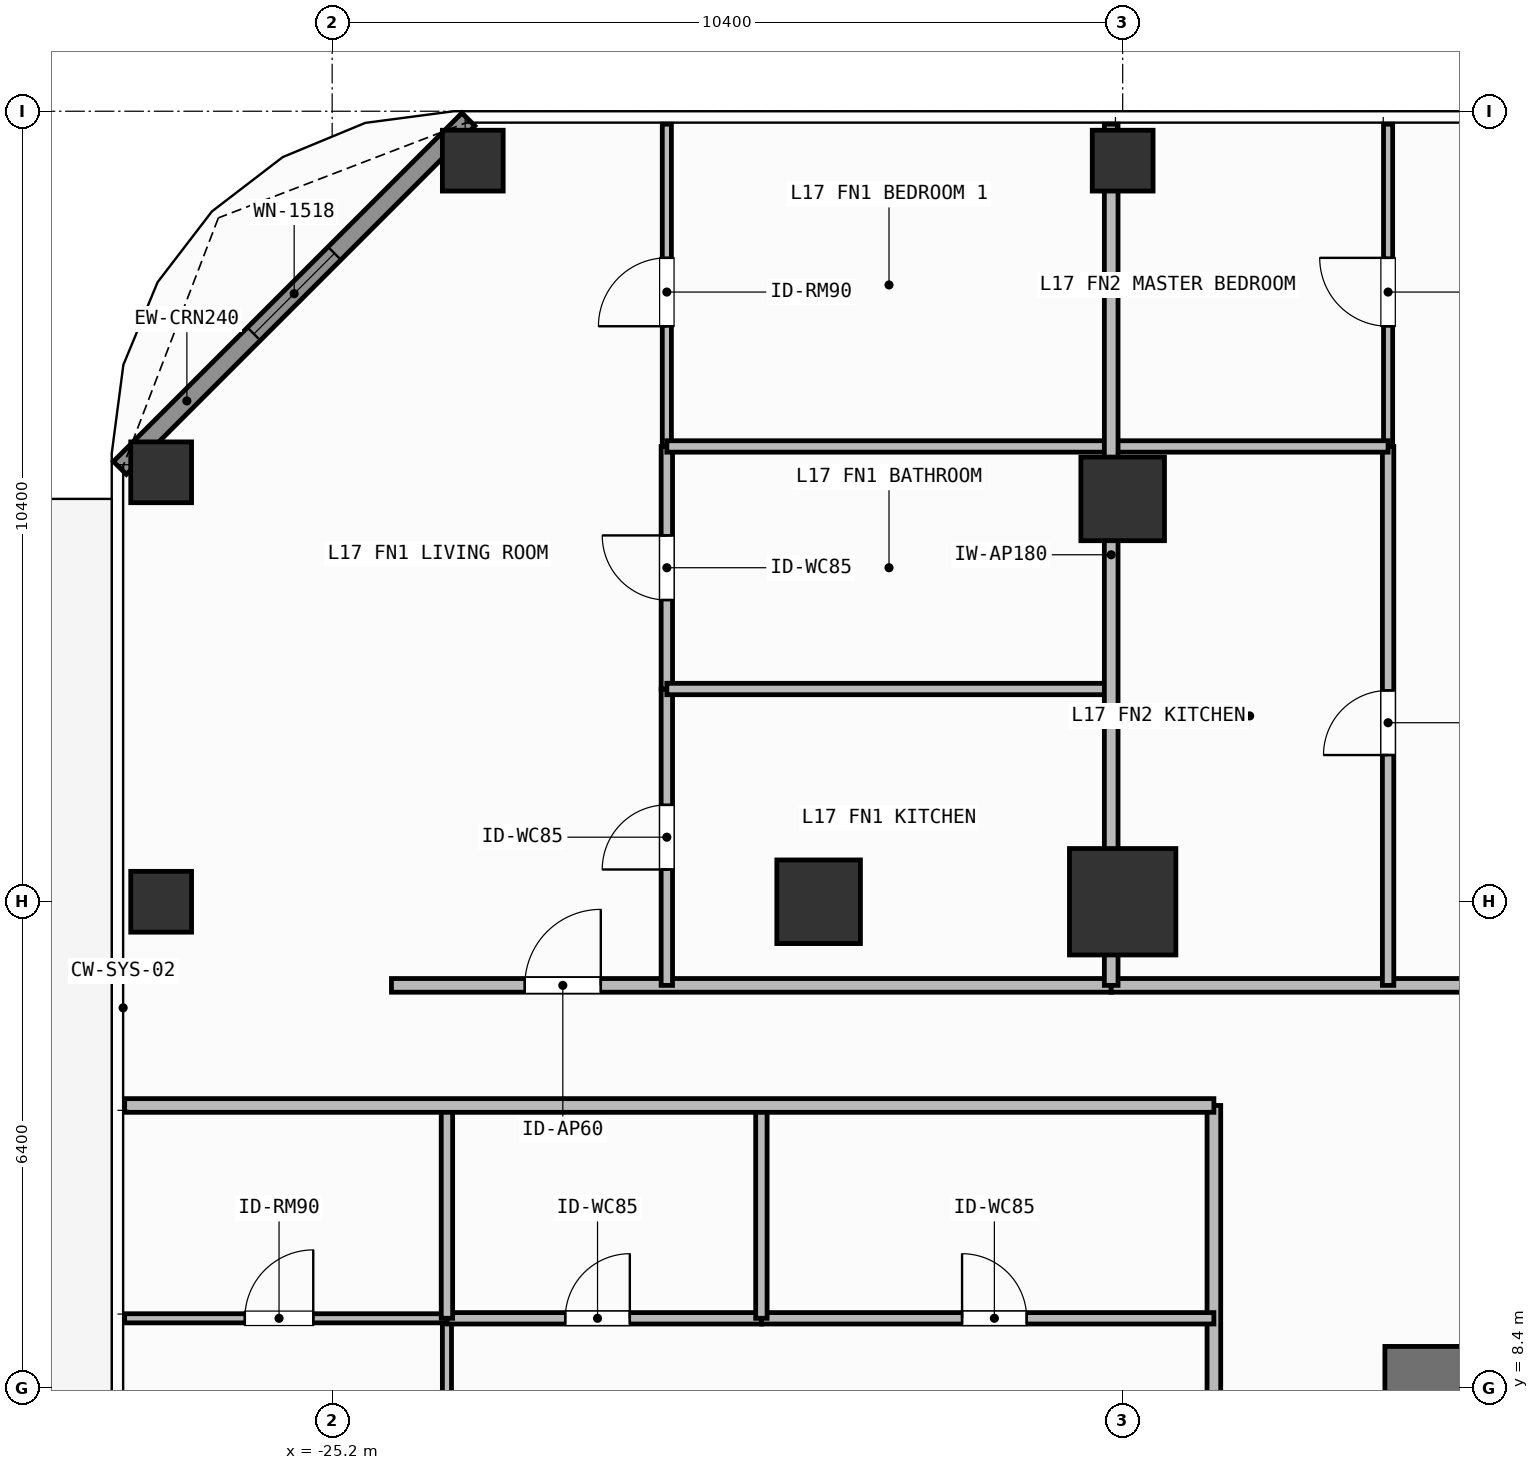
"""IFC4 building model, lengths in metres.
Left out: names, types, materials, properties, quantities, classifications, styles, units other than length and angle.
Written with IfcOpenShell. Run it as: python <this file> out.ifc"""

import sys

from ifc_helpers import new_model, si_unit, direction, frame, frame_2d, origin, origin_2d, place, context, subcontext, project, spatial, rectangle, hollow_rectangle, extrude, element, fill, save


model = new_model("IFC4")
c1 = context("Model", 3, precision=1e-05, world=origin(), true_north=direction((0.0, 1.0)))
c2 = subcontext(c1, "Body", "Model", "MODEL_VIEW")
j1 = project(units=[si_unit("LENGTHUNIT", "METRE"), si_unit("PLANEANGLEUNIT", "RADIAN")], contexts=[c1])
p1 = place(None, origin())
s1 = spatial("IfcSite", under=j1, at=p1, CompositionType="ELEMENT")
p2 = place(p1, origin())
s2 = spatial("IfcBuilding", under=s1, at=p2, CompositionType="ELEMENT")
p3 = place(p2, frame((0.0, 0.0, 65.7)))
s3 = spatial("IfcBuildingStorey", under=s2, at=p3, CompositionType="ELEMENT", Elevation=65.7)
p4 = place(p3, frame((-11.35, 8.4, 0.0), z_axis=(0.0, 0.0, 1.0), x_axis=(1.0, 0.0, 0.0)))
e1 = element("IfcWall", 1, at=p4, inside=s3, PredefinedType="SHEAR", context=c2, shape_type="SweptSolid", body=[
    extrude(rectangle(XDim=1.65, YDim=1.1, at=frame_2d((0.825, 0.0))), origin(), (0.0, 0.0, 1.0), 3.9),
])
p5 = place(p3, frame((-14.8, 14.8, 0.0), z_axis=(0.0, 0.0, 1.0), x_axis=(1.0, 0.0, 0.0)))
e2 = element("IfcColumn", 2, at=p5, inside=s3, PredefinedType="COLUMN", context=c2, shape_type="SweptSolid", body=[
    extrude(rectangle(XDim=1.4, YDim=1.4, at=origin_2d()), origin(), (0.0, 0.0, 1.0), 3.9),
])
for number, where, z_axis, x_axis in (
    (3, (-18.8, 14.8, 0.0), (0.0, 0.0, 1.0), (1.0, 0.0, 0.0)),
    (4, (-14.8, 20.1, 0.0), (0.0, 0.0, 1.0), (1.0, 0.0, 0.0)),
):
    element("IfcColumn", number, at=place(p3, frame(where, z_axis=z_axis, x_axis=x_axis)), inside=s3, PredefinedType="COLUMN", context=c2, shape_type="SweptSolid", body=[
        extrude(rectangle(XDim=1.1, YDim=1.1, at=origin_2d()), origin(), (0.0, 0.0, 1.0), 3.9),
    ])
for number, where, z_axis, x_axis in (
    (5, (-23.35, 24.55, 0.0), (0.0, 0.0, 1.0), (1.0, 0.0, 0.0)),
    (6, (-27.45, 20.45, 0.0), (0.0, 0.0, 1.0), (1.0, 0.0, 0.0)),
    (7, (-14.8, 24.55, 0.0), (0.0, 0.0, 1.0), (1.0, 0.0, 0.0)),
    (8, (-27.45, 14.8, 0.0), (0.0, 0.0, 1.0), (1.0, 0.0, 0.0)),
):
    element("IfcColumn", number, at=place(p3, frame(where, z_axis=z_axis, x_axis=x_axis)), inside=s3, PredefinedType="COLUMN", context=c2, shape_type="SweptSolid", body=[
        extrude(hollow_rectangle(XDim=0.8, YDim=0.8, WallThickness=0.036, at=origin_2d()), origin(), (0.0, 0.0, 1.0), 3.9),
    ])
p6 = place(p3, frame((-27.992, 20.508, 0.0), z_axis=(0.0, 0.0, 1.0), x_axis=(0.707106781187, 0.707106781187, 0.0)))
e9 = element("IfcWall", 9, at=p6, inside=s3, PredefinedType="SOLIDWALL", context=c2, shape_type="SweptSolid", body=[
    extrude(rectangle(XDim=6.484, YDim=0.24, at=frame_2d((3.242, 0.0))), origin(), (0.0, 0.0, 1.0), 3.68),
])
p7 = place(p6, frame((2.492, 0.0, 0.8)))
e10 = element("IfcOpeningElement", 10, at=p7, cuts=e9, PredefinedType="OPENING", context=c2, shape_type="SweptSolid", body=[
    extrude(rectangle(XDim=1.5, YDim=1.85, at=frame_2d((0.75, 0.925))), frame((0.0, 0.13, 0.0), z_axis=(0.0, -1.0, 0.0), x_axis=(1.0, 0.0, 0.0)), (0.0, 0.0, 1.0), 0.26),
])
p8 = place(p3, frame((-24.42, 13.7, 0.0), z_axis=(0.0, 0.0, 1.0), x_axis=(1.0, 0.0, 0.0)))
e11 = element("IfcWall", 11, at=p8, inside=s3, PredefinedType="PARTITIONING", context=c2, shape_type="SweptSolid", body=[
    extrude(rectangle(XDim=9.469, YDim=0.18, at=frame_2d((4.734, 0.0))), origin(), (0.0, 0.0, 1.0), 3.68),
])
p9 = place(p8, frame((1.754, 0.0, 0.0)))
e12 = element("IfcOpeningElement", 12, at=p9, cuts=e11, PredefinedType="OPENING", context=c2, shape_type="SweptSolid", body=[
    extrude(rectangle(XDim=1.0, YDim=2.2, at=frame_2d((0.5, 1.1))), frame((0.0, 0.1, 0.0), z_axis=(0.0, -1.0, 0.0), x_axis=(1.0, 0.0, 0.0)), (0.0, 0.0, 1.0), 0.2),
])
p10 = place(p3, frame((-20.797, 13.7, 0.0), z_axis=(0.0, 0.0, 1.0), x_axis=(0.0, 1.0, 0.0)))
e13 = element("IfcWall", 13, at=p10, inside=s3, PredefinedType="PARTITIONING", context=c2, shape_type="SweptSolid", body=[
    extrude(rectangle(XDim=3.899, YDim=0.15, at=frame_2d((1.95, 0.0))), origin(), (0.0, 0.0, 1.0), 3.68),
])
p11 = place(p10, frame((1.524, 0.0, 0.0)))
e14 = element("IfcOpeningElement", 14, at=p11, cuts=e13, PredefinedType="OPENING", context=c2, shape_type="SweptSolid", body=[
    extrude(rectangle(XDim=0.85, YDim=2.1, at=frame_2d((0.425, 1.05))), frame((0.0, 0.085, 0.0), z_axis=(0.0, -1.0, 0.0), x_axis=(1.0, 0.0, 0.0)), (0.0, 0.0, 1.0), 0.17),
])
p12 = place(p3, frame((-20.797, 17.599, 0.0), z_axis=(0.0, 0.0, 1.0), x_axis=(0.0, 1.0, 0.0)))
e15 = element("IfcWall", 15, at=p12, inside=s3, PredefinedType="PARTITIONING", context=c2, shape_type="SweptSolid", body=[
    extrude(rectangle(XDim=3.191, YDim=0.15, at=frame_2d((1.595, 0.0))), origin(), (0.0, 0.0, 1.0), 3.68),
])
p13 = place(p12, frame((1.17, 0.0, 0.0)))
e16 = element("IfcOpeningElement", 16, at=p13, cuts=e15, PredefinedType="OPENING", context=c2, shape_type="SweptSolid", body=[
    extrude(rectangle(XDim=0.85, YDim=2.1, at=frame_2d((0.425, 1.05))), frame((0.0, 0.085, 0.0), z_axis=(0.0, -1.0, 0.0), x_axis=(1.0, 0.0, 0.0)), (0.0, 0.0, 1.0), 0.17),
])
p14 = place(p3, frame((-20.797, 20.79, 0.0), z_axis=(0.0, 0.0, 1.0), x_axis=(0.0, 1.0, 0.0)))
e17 = element("IfcWall", 17, at=p14, inside=s3, PredefinedType="PARTITIONING", context=c2, shape_type="SweptSolid", body=[
    extrude(rectangle(XDim=4.24, YDim=0.12, at=frame_2d((2.12, 0.0))), origin(), (0.0, 0.0, 1.0), 3.68),
])
p15 = place(p14, frame((1.581, 0.0, 0.0)))
e18 = element("IfcOpeningElement", 18, at=p15, cuts=e17, PredefinedType="OPENING", context=c2, shape_type="SweptSolid", body=[
    extrude(rectangle(XDim=0.9, YDim=2.1, at=frame_2d((0.45, 1.05))), frame((0.0, 0.07, 0.0), z_axis=(0.0, -1.0, 0.0), x_axis=(1.0, 0.0, 0.0)), (0.0, 0.0, 1.0), 0.14),
])
p16 = place(p3, frame((-14.951, 13.7, 0.0), z_axis=(0.0, 0.0, 1.0), x_axis=(1.0, 0.0, 0.0)))
e19 = element("IfcWall", 19, at=p16, inside=s3, PredefinedType="PARTITIONING", context=c2, shape_type="SweptSolid", body=[
    extrude(rectangle(XDim=12.051, YDim=0.18, at=frame_2d((6.025, 0.0))), origin(), (0.0, 0.0, 1.0), 3.68),
])
p17 = place(p16, frame((5.704, 0.0, 0.0)))
e20 = element("IfcOpeningElement", 20, at=p17, cuts=e19, PredefinedType="OPENING", context=c2, shape_type="SweptSolid", body=[
    extrude(rectangle(XDim=1.0, YDim=2.2, at=frame_2d((0.5, 1.1))), frame((0.0, 0.1, 0.0), z_axis=(0.0, -1.0, 0.0), x_axis=(1.0, 0.0, 0.0)), (0.0, 0.0, 1.0), 0.2),
])
p18 = place(p3, frame((-11.308, 13.7, 0.0), z_axis=(0.0, 0.0, 1.0), x_axis=(0.0, 1.0, 0.0)))
e21 = element("IfcWall", 21, at=p18, inside=s3, PredefinedType="PARTITIONING", context=c2, shape_type="SweptSolid", body=[
    extrude(rectangle(XDim=7.09, YDim=0.15, at=frame_2d((3.545, 0.0))), origin(), (0.0, 0.0, 1.0), 3.37),
])
p19 = place(p18, frame((3.03, 0.0, 0.0)))
e22 = element("IfcOpeningElement", 22, at=p19, cuts=e21, PredefinedType="OPENING", context=c2, shape_type="SweptSolid", body=[
    extrude(rectangle(XDim=0.85, YDim=2.1, at=frame_2d((0.425, 1.05))), frame((0.0, 0.085, 0.0), z_axis=(0.0, -1.0, 0.0), x_axis=(1.0, 0.0, 0.0)), (0.0, 0.0, 1.0), 0.17),
])
p20 = place(p3, frame((-11.308, 20.79, 0.0), z_axis=(0.0, 0.0, 1.0), x_axis=(0.0, 1.0, 0.0)))
e23 = element("IfcWall", 23, at=p20, inside=s3, PredefinedType="PARTITIONING", context=c2, shape_type="SweptSolid", body=[
    extrude(rectangle(XDim=4.24, YDim=0.12, at=frame_2d((2.12, 0.0))), origin(), (0.0, 0.0, 1.0), 3.37),
])
p21 = place(p20, frame((1.581, 0.0, 0.0)))
e24 = element("IfcOpeningElement", 24, at=p21, cuts=e23, PredefinedType="OPENING", context=c2, shape_type="SweptSolid", body=[
    extrude(rectangle(XDim=0.9, YDim=2.1, at=frame_2d((0.45, 1.05))), frame((0.0, 0.07, 0.0), z_axis=(0.0, -1.0, 0.0), x_axis=(1.0, 0.0, 0.0)), (0.0, 0.0, 1.0), 0.14),
])
p22 = place(p3, frame((-13.6, -0.873, 0.0), z_axis=(0.0, 0.0, 1.0), x_axis=(0.0, 1.0, 0.0)))
e25 = element("IfcWall", 25, at=p22, inside=s3, PredefinedType="PARTITIONING", context=c2, shape_type="SweptSolid", body=[
    extrude(rectangle(XDim=12.993, YDim=0.18, at=frame_2d((6.497, 0.0))), origin(), (0.0, 0.0, 1.0), 3.68),
])
p23 = place(p22, frame((6.446, 0.0, 0.0)))
e26 = element("IfcOpeningElement", 26, at=p23, cuts=e25, PredefinedType="OPENING", context=c2, shape_type="SweptSolid", body=[
    extrude(rectangle(XDim=1.0, YDim=2.2, at=frame_2d((0.5, 1.1))), frame((0.0, 0.1, 0.0), z_axis=(0.0, -1.0, 0.0), x_axis=(1.0, 0.0, 0.0)), (0.0, 0.0, 1.0), 0.2),
])
p24 = place(p3, frame((-23.69, 3.097, 0.0), z_axis=(0.0, 0.0, 1.0), x_axis=(0.0, 1.0, 0.0)))
e27 = element("IfcWall", 27, at=p24, inside=s3, PredefinedType="PARTITIONING", context=c2, shape_type="SweptSolid", body=[
    extrude(rectangle(XDim=6.223, YDim=0.12, at=frame_2d((3.112, 0.0))), origin(), (0.0, 0.0, 1.0), 3.68),
])
p25 = place(p24, frame((2.662, 0.0, 0.0)))
e28 = element("IfcOpeningElement", 28, at=p25, cuts=e27, PredefinedType="OPENING", context=c2, shape_type="SweptSolid", body=[
    extrude(rectangle(XDim=0.9, YDim=2.1, at=frame_2d((0.45, 1.05))), frame((0.0, 0.07, 0.0), z_axis=(0.0, -1.0, 0.0), x_axis=(1.0, 0.0, 0.0)), (0.0, 0.0, 1.0), 0.14),
])
p26 = place(p3, frame((-23.69, 9.32, 0.0), z_axis=(0.0, 0.0, 1.0), x_axis=(1.0, 0.0, 0.0)))
e29 = element("IfcWall", 29, at=p26, inside=s3, PredefinedType="PARTITIONING", context=c2, shape_type="SweptSolid", body=[
    extrude(rectangle(XDim=4.137, YDim=0.15, at=frame_2d((2.068, 0.0))), origin(), (0.0, 0.0, 1.0), 3.68),
])
p27 = place(p26, frame((1.556, 0.0, 0.0)))
e30 = element("IfcOpeningElement", 30, at=p27, cuts=e29, PredefinedType="OPENING", context=c2, shape_type="SweptSolid", body=[
    extrude(rectangle(XDim=0.85, YDim=2.1, at=frame_2d((0.425, 1.05))), frame((0.0, 0.085, 0.0), z_axis=(0.0, -1.0, 0.0), x_axis=(1.0, 0.0, 0.0)), (0.0, 0.0, 1.0), 0.17),
])
p28 = place(p3, frame((-19.553, 9.32, 0.0), z_axis=(0.0, 0.0, 1.0), x_axis=(1.0, 0.0, 0.0)))
e31 = element("IfcWall", 31, at=p28, inside=s3, PredefinedType="PARTITIONING", context=c2, shape_type="SweptSolid", body=[
    extrude(rectangle(XDim=5.953, YDim=0.15, at=frame_2d((2.977, 0.0))), origin(), (0.0, 0.0, 1.0), 3.68),
])
p29 = place(p28, frame((2.64, 0.0, 0.0)))
e32 = element("IfcOpeningElement", 32, at=p29, cuts=e31, PredefinedType="OPENING", context=c2, shape_type="SweptSolid", body=[
    extrude(rectangle(XDim=0.85, YDim=2.1, at=frame_2d((0.425, 1.05))), frame((0.0, 0.085, 0.0), z_axis=(0.0, -1.0, 0.0), x_axis=(1.0, 0.0, 0.0)), (0.0, 0.0, 1.0), 0.17),
])
p30 = place(p3, frame((-27.93, 9.32, 0.0), z_axis=(0.0, 0.0, 1.0), x_axis=(1.0, 0.0, 0.0)))
e33 = element("IfcWall", 33, at=p30, inside=s3, PredefinedType="PARTITIONING", context=c2, shape_type="SweptSolid", body=[
    extrude(rectangle(XDim=4.24, YDim=0.12, at=frame_2d((2.12, 0.0))), origin(), (0.0, 0.0, 1.0), 3.68),
])
p31 = place(p30, frame((1.581, 0.0, 0.0)))
e34 = element("IfcOpeningElement", 34, at=p31, cuts=e33, PredefinedType="OPENING", context=c2, shape_type="SweptSolid", body=[
    extrude(rectangle(XDim=0.9, YDim=2.1, at=frame_2d((0.45, 1.05))), frame((0.0, 0.07, 0.0), z_axis=(0.0, -1.0, 0.0), x_axis=(1.0, 0.0, 0.0)), (0.0, 0.0, 1.0), 0.14),
])
for number, where, z_axis, x_axis in (
    (35, (-20.797, 17.599, 0.0), (0.0, 0.0, 1.0), (1.0, 0.0, 0.0)),
    (36, (-20.797, 20.79, 0.0), (0.0, 0.0, 1.0), (1.0, 0.0, 0.0)),
):
    element("IfcWall", number, at=place(p3, frame(where, z_axis=z_axis, x_axis=x_axis)), inside=s3, PredefinedType="PARTITIONING", context=c2, shape_type="SweptSolid", body=[
        extrude(rectangle(XDim=5.846, YDim=0.15, at=frame_2d((2.923, 0.0))), origin(), (0.0, 0.0, 1.0), 3.68),
    ])
p32 = place(p3, frame((-14.951, 20.79, 0.0), z_axis=(0.0, 0.0, 1.0), x_axis=(1.0, 0.0, 0.0)))
e37 = element("IfcWall", 37, at=p32, inside=s3, PredefinedType="PARTITIONING", context=c2, shape_type="SweptSolid", body=[
    extrude(rectangle(XDim=3.643, YDim=0.15, at=frame_2d((1.821, 0.0))), origin(), (0.0, 0.0, 1.0), 3.68),
])
p33 = place(p3, frame((-14.951, 13.7, 0.0), z_axis=(0.0, 0.0, 1.0), x_axis=(0.0, 1.0, 0.0)))
e38 = element("IfcWall", 38, at=p33, inside=s3, PredefinedType="PARTITIONING", context=c2, shape_type="SweptSolid", body=[
    extrude(rectangle(XDim=11.33, YDim=0.18, at=frame_2d((5.665, 0.0))), origin(), (0.0, 0.0, 1.0), 3.082),
])
for number, where, z_axis, x_axis in (
    (39, (-19.553, 9.32, 0.0), (0.0, 0.0, 1.0), (0.0, 1.0, 0.0)),
    (40, (-23.69, 9.32, 0.0), (0.0, 0.0, 1.0), (0.0, 1.0, 0.0)),
):
    element("IfcWall", number, at=place(p3, frame(where, z_axis=z_axis, x_axis=x_axis)), inside=s3, PredefinedType="PARTITIONING", context=c2, shape_type="SweptSolid", body=[
        extrude(rectangle(XDim=2.8, YDim=0.15, at=frame_2d((1.4, 0.0))), origin(), (0.0, 0.0, 1.0), 3.68),
    ])
p34 = place(p3, frame((-27.93, 12.12, 0.0), z_axis=(0.0, 0.0, 1.0), x_axis=(1.0, 0.0, 0.0)))
e41 = element("IfcWall", 41, at=p34, inside=s3, PredefinedType="PARTITIONING", context=c2, shape_type="SweptSolid", body=[
    extrude(rectangle(XDim=14.33, YDim=0.18, at=frame_2d((7.165, 0.0))), origin(), (0.0, 0.0, 1.0), 3.68),
])
p35 = place(p7, origin())
e42 = element("IfcWindow", 42, at=p35, inside=s3, PartitioningType="SINGLE_PANEL", PredefinedType="WINDOW", context=c2, shape_type="SweptSolid", body=[
    extrude(rectangle(XDim=1.5, YDim=1.85, at=frame_2d((0.75, 0.925))), frame((0.0, 0.03, 0.0), z_axis=(0.0, -1.0, 0.0), x_axis=(1.0, 0.0, 0.0)), (0.0, 0.0, 1.0), 0.06),
])
fill(e10, e42)
p36 = place(p9, origin())
e43 = element("IfcDoor", 43, at=p36, inside=s3, OperationType="SINGLE_SWING_RIGHT", PredefinedType="DOOR", context=c2, shape_type="SweptSolid", body=[
    extrude(rectangle(XDim=1.0, YDim=2.2, at=frame_2d((0.5, 1.1))), frame((0.0, 0.025, 0.0), z_axis=(0.0, -1.0, 0.0), x_axis=(1.0, 0.0, 0.0)), (0.0, 0.0, 1.0), 0.05),
])
fill(e12, e43)
p37 = place(p11, origin())
e44 = element("IfcDoor", 44, at=p37, inside=s3, OperationType="SINGLE_SWING_LEFT", PredefinedType="DOOR", context=c2, shape_type="SweptSolid", body=[
    extrude(rectangle(XDim=0.85, YDim=2.1, at=frame_2d((0.425, 1.05))), frame((0.0, 0.025, 0.0), z_axis=(0.0, -1.0, 0.0), x_axis=(1.0, 0.0, 0.0)), (0.0, 0.0, 1.0), 0.05),
])
fill(e14, e44)
p38 = place(p13, origin())
e45 = element("IfcDoor", 45, at=p38, inside=s3, OperationType="SINGLE_SWING_RIGHT", PredefinedType="DOOR", context=c2, shape_type="SweptSolid", body=[
    extrude(rectangle(XDim=0.85, YDim=2.1, at=frame_2d((0.425, 1.05))), frame((0.0, 0.025, 0.0), z_axis=(0.0, -1.0, 0.0), x_axis=(1.0, 0.0, 0.0)), (0.0, 0.0, 1.0), 0.05),
])
fill(e16, e45)
p39 = place(p15, origin())
e46 = element("IfcDoor", 46, at=p39, inside=s3, OperationType="SINGLE_SWING_LEFT", PredefinedType="DOOR", context=c2, shape_type="SweptSolid", body=[
    extrude(rectangle(XDim=0.9, YDim=2.1, at=frame_2d((0.45, 1.05))), frame((0.0, 0.025, 0.0), z_axis=(0.0, -1.0, 0.0), x_axis=(1.0, 0.0, 0.0)), (0.0, 0.0, 1.0), 0.05),
])
fill(e18, e46)
p40 = place(p19, origin())
e47 = element("IfcDoor", 47, at=p40, inside=s3, OperationType="SINGLE_SWING_LEFT", PredefinedType="DOOR", context=c2, shape_type="SweptSolid", body=[
    extrude(rectangle(XDim=0.85, YDim=2.1, at=frame_2d((0.425, 1.05))), frame((0.0, 0.025, 0.0), z_axis=(0.0, -1.0, 0.0), x_axis=(1.0, 0.0, 0.0)), (0.0, 0.0, 1.0), 0.05),
])
fill(e22, e47)
p41 = place(p21, origin())
e48 = element("IfcDoor", 48, at=p41, inside=s3, OperationType="SINGLE_SWING_RIGHT", PredefinedType="DOOR", context=c2, shape_type="SweptSolid", body=[
    extrude(rectangle(XDim=0.9, YDim=2.1, at=frame_2d((0.45, 1.05))), frame((0.0, 0.025, 0.0), z_axis=(0.0, -1.0, 0.0), x_axis=(1.0, 0.0, 0.0)), (0.0, 0.0, 1.0), 0.05),
])
fill(e24, e48)
p42 = place(p27, origin())
e49 = element("IfcDoor", 49, at=p42, inside=s3, OperationType="SINGLE_SWING_RIGHT", PredefinedType="DOOR", context=c2, shape_type="SweptSolid", body=[
    extrude(rectangle(XDim=0.85, YDim=2.1, at=frame_2d((0.425, 1.05))), frame((0.0, 0.025, 0.0), z_axis=(0.0, -1.0, 0.0), x_axis=(1.0, 0.0, 0.0)), (0.0, 0.0, 1.0), 0.05),
])
fill(e30, e49)
p43 = place(p29, origin())
e50 = element("IfcDoor", 50, at=p43, inside=s3, OperationType="SINGLE_SWING_LEFT", PredefinedType="DOOR", context=c2, shape_type="SweptSolid", body=[
    extrude(rectangle(XDim=0.85, YDim=2.1, at=frame_2d((0.425, 1.05))), frame((0.0, 0.025, 0.0), z_axis=(0.0, -1.0, 0.0), x_axis=(1.0, 0.0, 0.0)), (0.0, 0.0, 1.0), 0.05),
])
fill(e32, e50)
p44 = place(p31, origin())
e51 = element("IfcDoor", 51, at=p44, inside=s3, OperationType="SINGLE_SWING_RIGHT", PredefinedType="DOOR", context=c2, shape_type="SweptSolid", body=[
    extrude(rectangle(XDim=0.9, YDim=2.1, at=frame_2d((0.45, 1.05))), frame((0.0, 0.025, 0.0), z_axis=(0.0, -1.0, 0.0), x_axis=(1.0, 0.0, 0.0)), (0.0, 0.0, 1.0), 0.05),
])
fill(e34, e51)
save(model, sys.argv[1])
